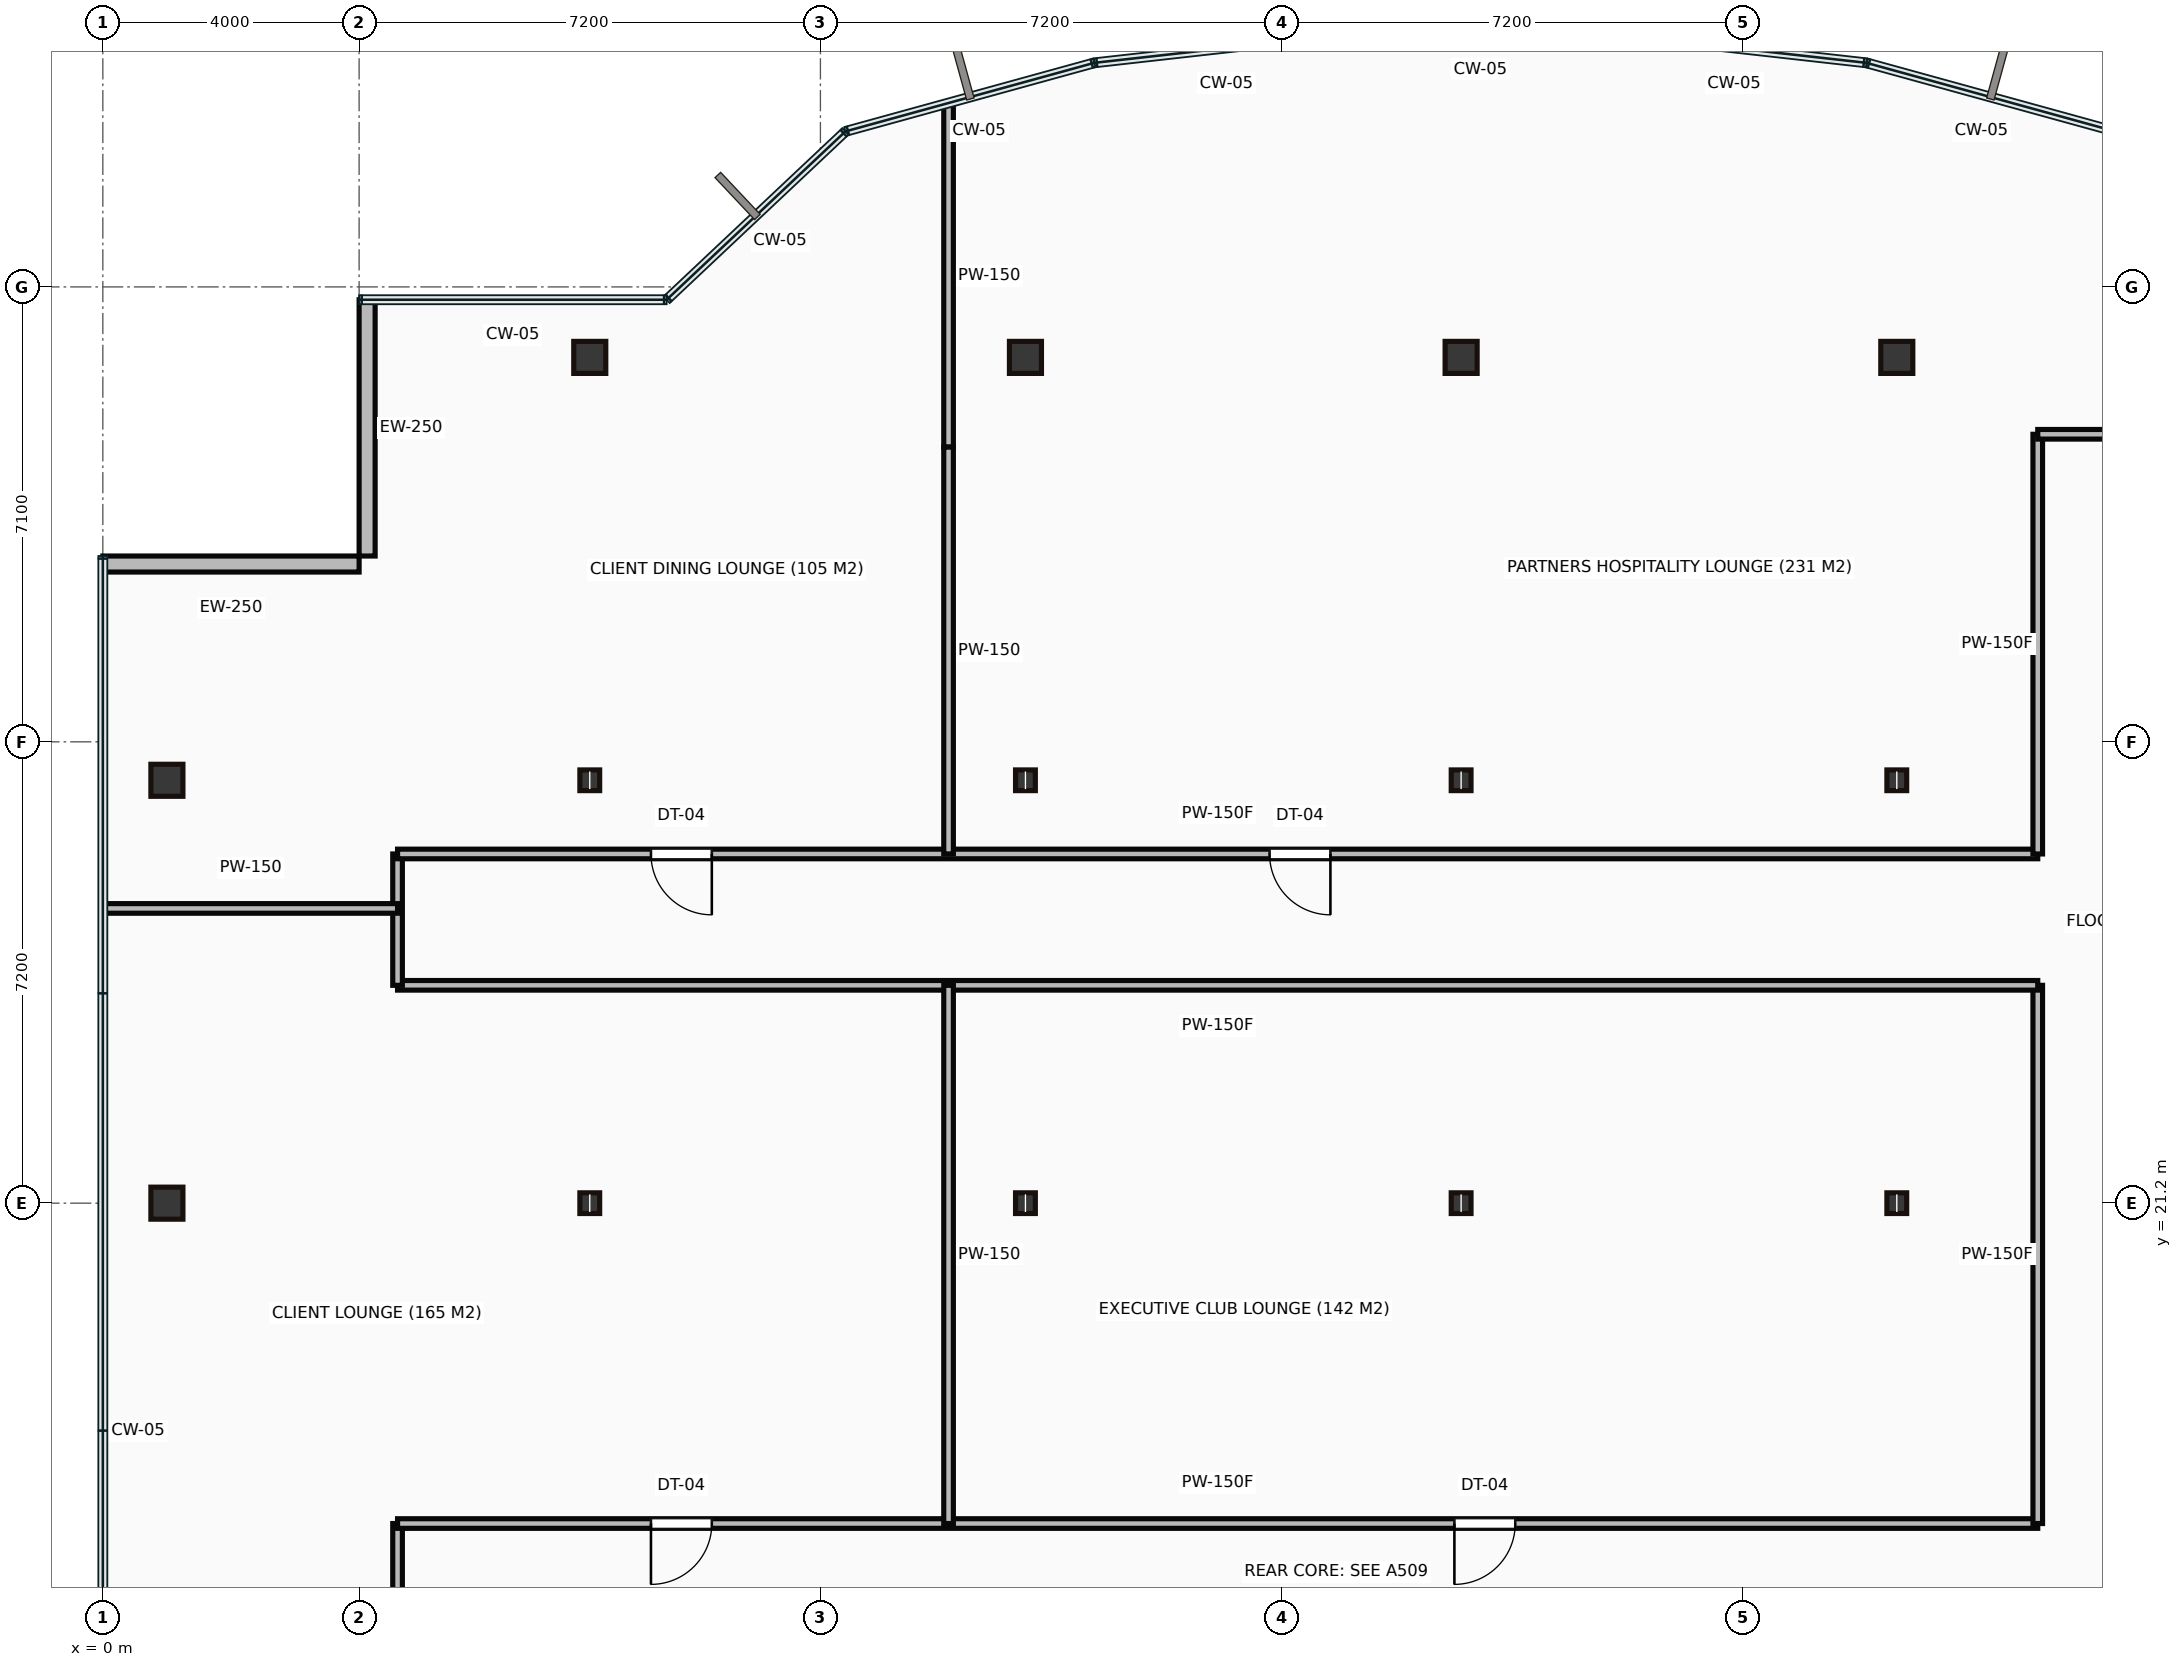
"""IFC4 building model, lengths in metres.
Left out: names, types, materials, properties, quantities, classifications, styles, units other than length and angle.
Written with IfcOpenShell. Run it as: python <this file> out.ifc"""

import sys

from ifc_helpers import new_model, si_unit, direction, frame, frame_2d, origin, origin_2d, place, context, subcontext, project, spatial, rectangle, hollow_rectangle, i_section, extrude, source, transform, mapped, element, fill, save


model = new_model("IFC4")
c1 = context("Model", 3, precision=1e-05, world=origin(), true_north=direction((0.0, 1.0)))
c2 = subcontext(c1, "Body", "Model", "MODEL_VIEW")
j1 = project(units=[si_unit("LENGTHUNIT", "METRE"), si_unit("PLANEANGLEUNIT", "RADIAN")], contexts=[c1])
p1 = place(None, origin())
s1 = spatial("IfcSite", under=j1, at=p1, CompositionType="ELEMENT")
p2 = place(p1, origin())
s2 = spatial("IfcBuilding", under=s1, at=p2, CompositionType="ELEMENT")
p3 = place(p2, frame((0.0, 0.0, 221.45)))
s3 = spatial("IfcBuildingStorey", under=s2, at=p3, CompositionType="ELEMENT", Elevation=221.45)
m1 = source(origin(), c2, "Body", "SweptSolid", [
    extrude(hollow_rectangle(XDim=0.5, YDim=0.5, WallThickness=0.022, at=origin_2d()), origin(), (0.0, 0.0, 1.0), 3.65),
])
for number, where, z_axis, x_axis in (
    (1, (1.0, 21.2, 0.0), (0.0, 0.0, 1.0), (1.0, 0.0, 0.0)),
    (2, (1.0, 27.8, 0.0), (0.0, 0.0, 1.0), (1.0, 0.0, 0.0)),
):
    element("IfcColumn", number, at=place(p3, frame(where, z_axis=z_axis, x_axis=x_axis)), inside=s3, PredefinedType="COLUMN", context=c2, shape_type="MappedRepresentation", body=[
        mapped(m1, transform((0.0, 0.0, 0.0))),
    ])
m2 = source(origin(), c2, "Body", "SweptSolid", [
    extrude(i_section(OverallWidth=0.309, OverallDepth=0.323, WebThickness=0.014, FlangeThickness=0.023, at=origin_2d()), origin(), (0.0, 0.0, 1.0), 3.65),
])
for number, where, z_axis, x_axis in (
    (3, (7.6, 21.2, 0.0), (0.0, 0.0, 1.0), (1.0, 0.0, 0.0)),
    (4, (7.6, 27.8, 0.0), (0.0, 0.0, 1.0), (1.0, 0.0, 0.0)),
):
    element("IfcColumn", number, at=place(p3, frame(where, z_axis=z_axis, x_axis=x_axis)), inside=s3, PredefinedType="COLUMN", context=c2, shape_type="MappedRepresentation", body=[
        mapped(m2, transform((0.0, 0.0, 0.0))),
    ])
p4 = place(p3, frame((7.6, 34.4, 0.0), z_axis=(0.0, 0.0, 1.0), x_axis=(1.0, 0.0, 0.0)))
e5 = element("IfcColumn", 5, at=p4, inside=s3, PredefinedType="COLUMN", context=c2, shape_type="MappedRepresentation", body=[
    mapped(m1, transform((0.0, 0.0, 0.0))),
])
for number, where, z_axis, x_axis in (
    (6, (14.4, 21.2, 0.0), (0.0, 0.0, 1.0), (1.0, 0.0, 0.0)),
    (7, (14.4, 27.8, 0.0), (0.0, 0.0, 1.0), (1.0, 0.0, 0.0)),
):
    element("IfcColumn", number, at=place(p3, frame(where, z_axis=z_axis, x_axis=x_axis)), inside=s3, PredefinedType="COLUMN", context=c2, shape_type="MappedRepresentation", body=[
        mapped(m2, transform((0.0, 0.0, 0.0))),
    ])
p5 = place(p3, frame((14.4, 34.4, 0.0), z_axis=(0.0, 0.0, 1.0), x_axis=(1.0, 0.0, 0.0)))
e8 = element("IfcColumn", 8, at=p5, inside=s3, PredefinedType="COLUMN", context=c2, shape_type="MappedRepresentation", body=[
    mapped(m1, transform((0.0, 0.0, 0.0))),
])
for number, where, z_axis, x_axis in (
    (9, (21.2, 21.2, 0.0), (0.0, 0.0, 1.0), (1.0, 0.0, 0.0)),
    (10, (21.2, 27.8, 0.0), (0.0, 0.0, 1.0), (1.0, 0.0, 0.0)),
):
    element("IfcColumn", number, at=place(p3, frame(where, z_axis=z_axis, x_axis=x_axis)), inside=s3, PredefinedType="COLUMN", context=c2, shape_type="MappedRepresentation", body=[
        mapped(m2, transform((0.0, 0.0, 0.0))),
    ])
p6 = place(p3, frame((21.2, 34.4, 0.0), z_axis=(0.0, 0.0, 1.0), x_axis=(1.0, 0.0, 0.0)))
e11 = element("IfcColumn", 11, at=p6, inside=s3, PredefinedType="COLUMN", context=c2, shape_type="MappedRepresentation", body=[
    mapped(m1, transform((0.0, 0.0, 0.0))),
])
for number, where, z_axis, x_axis in (
    (12, (28.0, 21.2, 0.0), (0.0, 0.0, 1.0), (1.0, 0.0, 0.0)),
    (13, (28.0, 27.8, 0.0), (0.0, 0.0, 1.0), (1.0, 0.0, 0.0)),
):
    element("IfcColumn", number, at=place(p3, frame(where, z_axis=z_axis, x_axis=x_axis)), inside=s3, PredefinedType="COLUMN", context=c2, shape_type="MappedRepresentation", body=[
        mapped(m2, transform((0.0, 0.0, 0.0))),
    ])
p7 = place(p3, frame((28.0, 34.4, 0.0), z_axis=(0.0, 0.0, 1.0), x_axis=(1.0, 0.0, 0.0)))
e14 = element("IfcColumn", 14, at=p7, inside=s3, PredefinedType="COLUMN", context=c2, shape_type="MappedRepresentation", body=[
    mapped(m1, transform((0.0, 0.0, 0.0))),
])
m3 = source(origin(), c2, "Body", "SweptSolid", [
    extrude(rectangle(XDim=4.0, YDim=0.25, at=frame_2d((2.0, 0.0))), origin(), (0.0, 0.0, 1.0), 3.4),
])
for number, where, z_axis, x_axis in (
    (15, (4.125, 35.3, 0.0), (0.0, 0.0, 1.0), (0.0, -1.0, 0.0)),
    (16, (4.0, 31.175, 0.0), (0.0, 0.0, 1.0), (-1.0, 0.0, 0.0)),
):
    element("IfcWall", number, at=place(p3, frame(where, z_axis=z_axis, x_axis=x_axis)), inside=s3, PredefinedType="STANDARD", context=c2, shape_type="MappedRepresentation", body=[
        mapped(m3, transform((0.0, 0.0, 0.0))),
    ])
m4 = source(origin(), c2, "Body", "SweptSolid", [
    extrude(rectangle(XDim=2.12, YDim=0.15, at=frame_2d((1.06, 0.0))), origin(), (0.0, 0.0, 1.0), 3.4),
])
p8 = place(p3, frame((4.6, 14.08, 0.0), z_axis=(0.0, 0.0, 1.0), x_axis=(0.0, 1.0, 0.0)))
e17 = element("IfcWall", 17, at=p8, inside=s3, PredefinedType="PARTITIONING", context=c2, shape_type="MappedRepresentation", body=[
    mapped(m4, transform((0.0, 0.0, 0.0))),
])
m5 = source(origin(), c2, "Body", "SweptSolid", [
    extrude(rectangle(XDim=25.6, YDim=0.15, at=frame_2d((12.8, 0.0))), origin(), (0.0, 0.0, 1.0), 3.4),
])
p9 = place(p3, frame((4.6, 16.2, 0.0), z_axis=(0.0, 0.0, 1.0), x_axis=(1.0, 0.0, 0.0)))
e18 = element("IfcWall", 18, at=p9, inside=s3, PredefinedType="PARTITIONING", context=c2, shape_type="MappedRepresentation", body=[
    mapped(m5, transform((0.0, 0.0, 0.0))),
])
p10 = place(p9, frame((3.955, 0.0, 0.0)))
e19 = element("IfcOpeningElement", 19, at=p10, cuts=e18, PredefinedType="OPENING", context=c2, shape_type="SweptSolid", body=[
    extrude(rectangle(XDim=0.95, YDim=2.15, at=frame_2d((0.475, 1.075))), frame((0.0, 0.085, 0.0), z_axis=(0.0, -1.0, 0.0), x_axis=(1.0, 0.0, 0.0)), (0.0, 0.0, 1.0), 0.17),
])
p11 = place(p9, frame((16.495, 0.0, 0.0)))
e20 = element("IfcOpeningElement", 20, at=p11, cuts=e18, PredefinedType="OPENING", context=c2, shape_type="SweptSolid", body=[
    extrude(rectangle(XDim=0.95, YDim=2.15, at=frame_2d((0.475, 1.075))), frame((0.0, 0.085, 0.0), z_axis=(0.0, -1.0, 0.0), x_axis=(1.0, 0.0, 0.0)), (0.0, 0.0, 1.0), 0.17),
])
m6 = source(origin(), c2, "Body", "SweptSolid", [
    extrude(rectangle(XDim=8.4, YDim=0.15, at=frame_2d((4.2, 0.0))), origin(), (0.0, 0.0, 1.0), 3.4),
])
p12 = place(p3, frame((30.2, 16.2, 0.0), z_axis=(0.0, 0.0, 1.0), x_axis=(0.0, 1.0, 0.0)))
e21 = element("IfcWall", 21, at=p12, inside=s3, PredefinedType="PARTITIONING", context=c2, shape_type="MappedRepresentation", body=[
    mapped(m6, transform((0.0, 0.0, 0.0))),
])
p13 = place(p3, frame((30.2, 24.6, 0.0), z_axis=(0.0, 0.0, 1.0), x_axis=(-1.0, 0.0, 0.0)))
e22 = element("IfcWall", 22, at=p13, inside=s3, PredefinedType="PARTITIONING", context=c2, shape_type="MappedRepresentation", body=[
    mapped(m5, transform((0.0, 0.0, 0.0))),
])
m7 = source(origin(), c2, "Body", "SweptSolid", [
    extrude(rectangle(XDim=2.05, YDim=0.15, at=frame_2d((1.025, 0.0))), origin(), (0.0, 0.0, 1.0), 3.4),
])
p14 = place(p3, frame((4.6, 24.6, 0.0), z_axis=(0.0, 0.0, 1.0), x_axis=(0.0, 1.0, 0.0)))
e23 = element("IfcWall", 23, at=p14, inside=s3, PredefinedType="PARTITIONING", context=c2, shape_type="MappedRepresentation", body=[
    mapped(m7, transform((0.0, 0.0, 0.0))),
])
p15 = place(p3, frame((4.6, 26.65, 0.0), z_axis=(0.0, 0.0, 1.0), x_axis=(1.0, 0.0, 0.0)))
e24 = element("IfcWall", 24, at=p15, inside=s3, PredefinedType="PARTITIONING", context=c2, shape_type="MappedRepresentation", body=[
    mapped(m5, transform((0.0, 0.0, 0.0))),
])
p16 = place(p15, frame((3.955, 0.0, 0.0)))
e25 = element("IfcOpeningElement", 25, at=p16, cuts=e24, PredefinedType="OPENING", context=c2, shape_type="SweptSolid", body=[
    extrude(rectangle(XDim=0.95, YDim=2.15, at=frame_2d((0.475, 1.075))), frame((0.0, 0.085, 0.0), z_axis=(0.0, -1.0, 0.0), x_axis=(1.0, 0.0, 0.0)), (0.0, 0.0, 1.0), 0.17),
])
p17 = place(p15, frame((13.61, 0.0, 0.0)))
e26 = element("IfcOpeningElement", 26, at=p17, cuts=e24, PredefinedType="OPENING", context=c2, shape_type="SweptSolid", body=[
    extrude(rectangle(XDim=0.95, YDim=2.15, at=frame_2d((0.475, 1.075))), frame((0.0, 0.085, 0.0), z_axis=(0.0, -1.0, 0.0), x_axis=(1.0, 0.0, 0.0)), (0.0, 0.0, 1.0), 0.17),
])
m8 = source(origin(), c2, "Body", "SweptSolid", [
    extrude(rectangle(XDim=6.55, YDim=0.15, at=frame_2d((3.275, 0.0))), origin(), (0.0, 0.0, 1.0), 3.4),
])
p18 = place(p3, frame((30.2, 26.65, 0.0), z_axis=(0.0, 0.0, 1.0), x_axis=(0.0, 1.0, 0.0)))
e27 = element("IfcWall", 27, at=p18, inside=s3, PredefinedType="PARTITIONING", context=c2, shape_type="MappedRepresentation", body=[
    mapped(m8, transform((0.0, 0.0, 0.0))),
])
m9 = source(origin(), c2, "Body", "SweptSolid", [
    extrude(rectangle(XDim=2.2, YDim=0.15, at=frame_2d((1.1, 0.0))), origin(), (0.0, 0.0, 1.0), 3.4),
])
p19 = place(p3, frame((30.2, 33.2, 0.0), z_axis=(0.0, 0.0, 1.0), x_axis=(1.0, 0.0, 0.0)))
e28 = element("IfcWall", 28, at=p19, inside=s3, PredefinedType="PARTITIONING", context=c2, shape_type="MappedRepresentation", body=[
    mapped(m9, transform((0.0, 0.0, 0.0))),
])
m10 = source(origin(), c2, "Body", "SweptSolid", [
    extrude(rectangle(XDim=4.58, YDim=0.15, at=frame_2d((2.29, 0.0))), origin(), (0.0, 0.0, 1.0), 3.4),
])
p20 = place(p3, frame((0.02, 25.8, 0.0), z_axis=(0.0, 0.0, 1.0), x_axis=(1.0, 0.0, 0.0)))
e29 = element("IfcWall", 29, at=p20, inside=s3, PredefinedType="PARTITIONING", context=c2, shape_type="MappedRepresentation", body=[
    mapped(m10, transform((0.0, 0.0, 0.0))),
])
p21 = place(p3, frame((13.2, 24.6, 0.0), z_axis=(0.0, 0.0, 1.0), x_axis=(0.0, -1.0, 0.0)))
e30 = element("IfcWall", 30, at=p21, inside=s3, PredefinedType="PARTITIONING", context=c2, shape_type="MappedRepresentation", body=[
    mapped(m6, transform((0.0, 0.0, 0.0))),
])
m11 = source(origin(), c2, "Body", "SweptSolid", [
    extrude(rectangle(XDim=5.35, YDim=0.15, at=frame_2d((2.675, 0.0))), origin(), (0.0, 0.0, 1.0), 3.4),
])
p22 = place(p3, frame((13.2, 38.35, 0.0), z_axis=(0.0, 0.0, 1.0), x_axis=(0.0, -1.0, 0.0)))
e31 = element("IfcWall", 31, at=p22, inside=s3, PredefinedType="PARTITIONING", context=c2, shape_type="MappedRepresentation", body=[
    mapped(m11, transform((0.0, 0.0, 0.0))),
])
m12 = source(origin(), c2, "Body", "SweptSolid", [
    extrude(rectangle(XDim=6.35, YDim=0.15, at=frame_2d((3.175, 0.0))), origin(), (0.0, 0.0, 1.0), 3.4),
])
p23 = place(p3, frame((13.2, 33.0, 0.0), z_axis=(0.0, 0.0, 1.0), x_axis=(0.0, -1.0, 0.0)))
e32 = element("IfcWall", 32, at=p23, inside=s3, PredefinedType="PARTITIONING", context=c2, shape_type="MappedRepresentation", body=[
    mapped(m12, transform((0.0, 0.0, 0.0))),
])
m13 = source(origin(), c2, "Body", "SweptSolid", [
    extrude(rectangle(XDim=0.95, YDim=2.15, at=frame_2d((0.475, 1.075))), frame((0.0, 0.025, 0.0), z_axis=(0.0, -1.0, 0.0), x_axis=(1.0, 0.0, 0.0)), (0.0, 0.0, 1.0), 0.05),
])
p24 = place(p10, origin())
e33 = element("IfcDoor", 33, at=p24, inside=s3, OperationType="SINGLE_SWING_LEFT", PredefinedType="DOOR", context=c2, shape_type="MappedRepresentation", body=[
    mapped(m13, transform((0.0, 0.0, 0.0))),
])
fill(e19, e33)
p25 = place(p16, origin())
e34 = element("IfcDoor", 34, at=p25, inside=s3, OperationType="SINGLE_SWING_RIGHT", PredefinedType="DOOR", context=c2, shape_type="MappedRepresentation", body=[
    mapped(m13, transform((0.0, 0.0, 0.0))),
])
fill(e25, e34)
p26 = place(p11, origin())
e35 = element("IfcDoor", 35, at=p26, inside=s3, OperationType="SINGLE_SWING_LEFT", PredefinedType="DOOR", context=c2, shape_type="MappedRepresentation", body=[
    mapped(m13, transform((0.0, 0.0, 0.0))),
])
fill(e20, e35)
p27 = place(p17, origin())
e36 = element("IfcDoor", 36, at=p27, inside=s3, OperationType="SINGLE_SWING_RIGHT", PredefinedType="DOOR", context=c2, shape_type="MappedRepresentation", body=[
    mapped(m13, transform((0.0, 0.0, 0.0))),
])
fill(e26, e36)
save(model, sys.argv[1])
